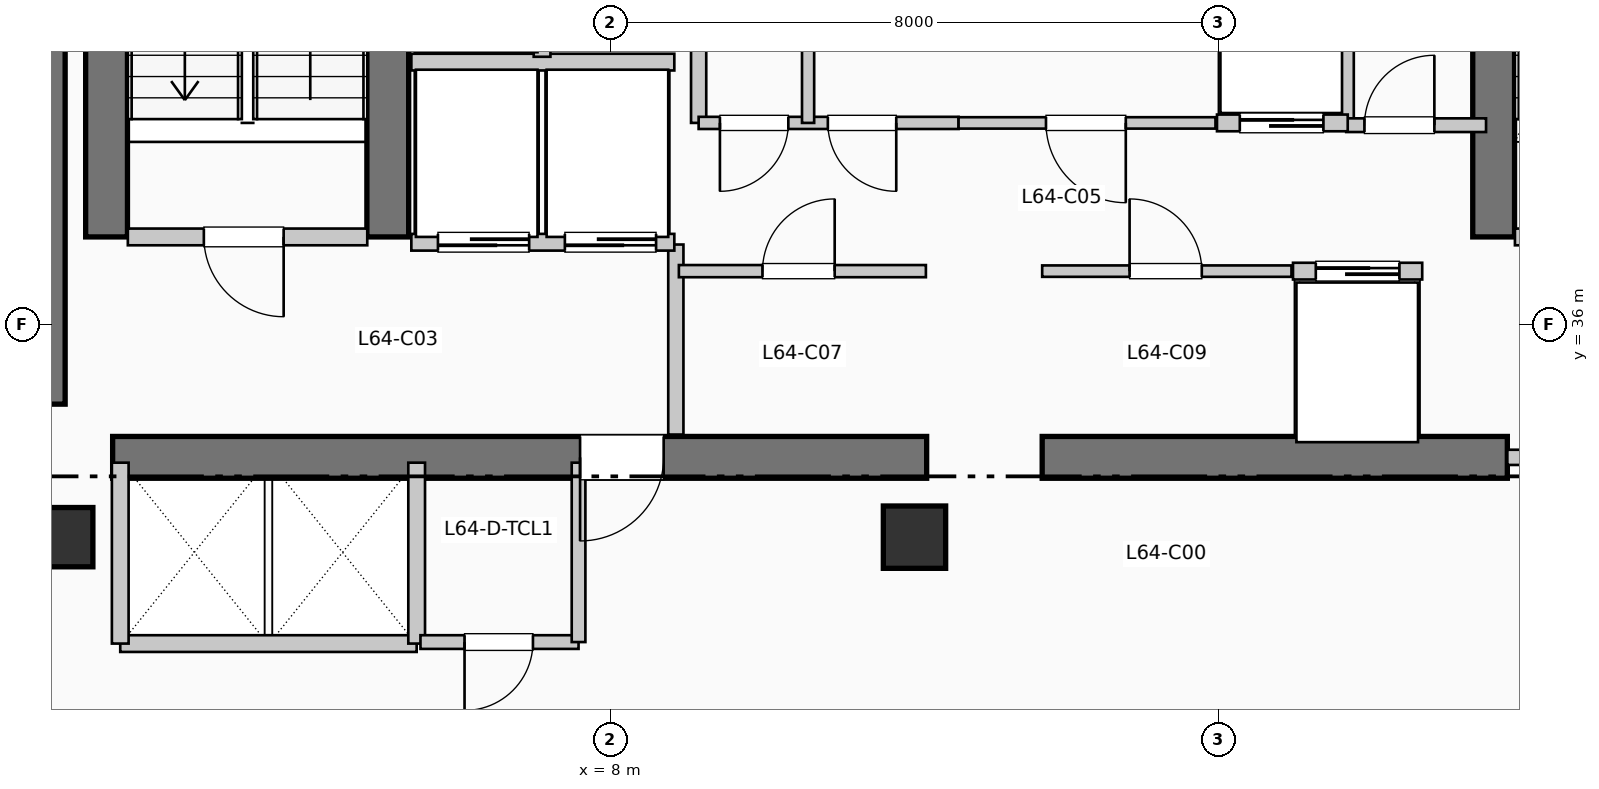
"""IFC4 building model, lengths in metres.
Left out: names, types, materials, properties, quantities, classifications, styles, units other than length and angle.
Written with IfcOpenShell. Run it as: python <this file> out.ifc"""

import sys

from ifc_helpers import new_model, si_unit, direction, frame, frame_2d, origin, origin_2d, place, context, subcontext, project, spatial, rectangle, extrude, element, fill, save


model = new_model("IFC4")
c1 = context("Model", 3, precision=1e-05, world=origin(), true_north=direction((0.0, 1.0)))
c2 = subcontext(c1, "Body", "Model", "MODEL_VIEW")
j1 = project(units=[si_unit("LENGTHUNIT", "METRE"), si_unit("PLANEANGLEUNIT", "RADIAN")], contexts=[c1])
p1 = place(None, origin())
s1 = spatial("IfcSite", under=j1, at=p1, CompositionType="ELEMENT")
p2 = place(p1, origin())
s2 = spatial("IfcBuilding", under=s1, at=p2, CompositionType="ELEMENT")
p3 = place(p2, frame((0.0, 0.0, 264.33)))
s3 = spatial("IfcBuildingStorey", under=s2, at=p3, CompositionType="ELEMENT", Elevation=264.33)
p4 = place(p3, frame((0.5, 34.95, 0.0), z_axis=(0.0, 0.0, 1.0), x_axis=(0.0, 1.0, 0.0)))
e1 = element("IfcWall", 1, at=p4, inside=s3, PredefinedType="SHEAR", context=c2, shape_type="SweptSolid", body=[
    extrude(rectangle(XDim=7.9, YDim=0.65, at=frame_2d((3.95, 0.0))), origin(), (0.0, 0.0, 1.0), 3.96),
])
p5 = place(p3, frame((1.45, 34.25, 0.0), z_axis=(0.0, 0.0, 1.0), x_axis=(1.0, 0.0, 0.0)))
e2 = element("IfcWall", 2, at=p5, inside=s3, PredefinedType="SHEAR", context=c2, shape_type="SweptSolid", body=[
    extrude(rectangle(XDim=10.71, YDim=0.55, at=frame_2d((5.355, 0.0))), origin(), (0.0, 0.0, 1.0), 3.96),
])
p6 = place(p5, frame((7.25, 0.0, 0.0), z_axis=(0.0, 0.0, 1.0), x_axis=(-1.0, 0.0, 0.0)))
e3 = element("IfcOpeningElement", 3, at=p6, cuts=e2, PredefinedType="OPENING", context=c2, shape_type="SweptSolid", body=[
    extrude(rectangle(XDim=1.1, YDim=2.15, at=frame_2d((0.55, 1.075))), frame((0.0, 0.285, 0.0), z_axis=(0.0, -1.0, 0.0), x_axis=(1.0, 0.0, 0.0)), (0.0, 0.0, 1.0), 0.57),
])
p7 = place(p3, frame((13.68, 34.25, 0.0), z_axis=(0.0, 0.0, 1.0), x_axis=(1.0, 0.0, 0.0)))
e4 = element("IfcWall", 4, at=p7, inside=s3, PredefinedType="SHEAR", context=c2, shape_type="SweptSolid", body=[
    extrude(rectangle(XDim=6.12, YDim=0.55, at=frame_2d((3.06, 0.0))), origin(), (0.0, 0.0, 1.0), 3.96),
])
for number, where, z_axis, x_axis in (
    (5, (1.37, 37.15, 0.0), (0.0, 0.0, 1.0), (0.0, 1.0, 0.0)),
    (6, (5.07, 37.15, 0.0), (0.0, 0.0, 1.0), (0.0, 1.0, 0.0)),
    (7, (19.62, 37.15, 0.0), (0.0, 0.0, 1.0), (0.0, 1.0, 0.0)),
):
    element("IfcWall", number, at=place(p3, frame(where, z_axis=z_axis, x_axis=x_axis)), inside=s3, PredefinedType="SHEAR", context=c2, shape_type="SweptSolid", body=[
        extrude(rectangle(XDim=7.89, YDim=0.55, at=frame_2d((3.945, 0.0))), origin(), (0.0, 0.0, 1.0), 3.96),
    ])
p8 = place(p3, frame((0.8, 33.2, 0.0), z_axis=(0.0, 0.0, 1.0), x_axis=(1.0, 0.0, 0.0)))
e8 = element("IfcColumn", 8, at=p8, inside=s3, PredefinedType="COLUMN", context=c2, shape_type="SweptSolid", body=[
    extrude(rectangle(XDim=0.78, YDim=0.78, at=origin_2d()), origin(), (0.0, 0.0, 1.0), 3.96),
])
p9 = place(p3, frame((12.0, 33.2, 0.0), z_axis=(0.0, 0.0, 1.0), x_axis=(1.0, 0.0, 0.0)))
e9 = element("IfcColumn", 9, at=p9, inside=s3, PredefinedType="COLUMN", context=c2, shape_type="SweptSolid", body=[
    extrude(rectangle(XDim=0.82, YDim=0.82, at=origin_2d()), origin(), (0.0, 0.0, 1.0), 3.96),
])
p10 = place(p3, frame((1.65, 37.15, 0.0), z_axis=(0.0, 0.0, 1.0), x_axis=(1.0, 0.0, 0.0)))
e10 = element("IfcWall", 10, at=p10, inside=s3, PredefinedType="PARTITIONING", context=c2, shape_type="SweptSolid", body=[
    extrude(rectangle(XDim=3.15, YDim=0.22, at=frame_2d((1.575, 0.0))), origin(), (0.0, 0.0, 1.0), 3.71),
])
p11 = place(p10, frame((2.05, 0.0, 0.0), z_axis=(0.0, 0.0, 1.0), x_axis=(-1.0, 0.0, 0.0)))
e11 = element("IfcOpeningElement", 11, at=p11, cuts=e10, PredefinedType="OPENING", context=c2, shape_type="SweptSolid", body=[
    extrude(rectangle(XDim=1.05, YDim=2.15, at=frame_2d((0.525, 1.075))), frame((0.0, 0.12, 0.0), z_axis=(0.0, -1.0, 0.0), x_axis=(1.0, 0.0, 0.0)), (0.0, 0.0, 1.0), 0.24),
])
p12 = place(p3, frame((8.86, 34.55, 0.0), z_axis=(0.0, 0.0, 1.0), x_axis=(0.0, 1.0, 0.0)))
e12 = element("IfcWall", 12, at=p12, inside=s3, PredefinedType="PARTITIONING", context=c2, shape_type="SweptSolid", body=[
    extrude(rectangle(XDim=2.5, YDim=0.2, at=frame_2d((1.25, 0.0))), origin(), (0.0, 0.0, 1.0), 3.71),
])
p13 = place(p3, frame((19.9, 37.15, 0.0), z_axis=(0.0, 0.0, 1.0), x_axis=(1.0, 0.0, 0.0)))
e13 = element("IfcWall", 13, at=p13, inside=s3, PredefinedType="PARTITIONING", context=c2, shape_type="SweptSolid", body=[
    extrude(rectangle(XDim=3.15, YDim=0.22, at=frame_2d((1.575, 0.0))), origin(), (0.0, 0.0, 1.0), 3.71),
])
p14 = place(p13, frame((2.05, 0.0, 0.0), z_axis=(0.0, 0.0, 1.0), x_axis=(-1.0, 0.0, 0.0)))
e14 = element("IfcOpeningElement", 14, at=p14, cuts=e13, PredefinedType="OPENING", context=c2, shape_type="SweptSolid", body=[
    extrude(rectangle(XDim=1.05, YDim=2.15, at=frame_2d((0.525, 1.075))), frame((0.0, 0.12, 0.0), z_axis=(0.0, -1.0, 0.0), x_axis=(1.0, 0.0, 0.0)), (0.0, 0.0, 1.0), 0.24),
])
p15 = place(p3, frame((19.8, 34.25, 0.0), z_axis=(0.0, 0.0, 1.0), x_axis=(1.0, 0.0, 0.0)))
e15 = element("IfcWall", 15, at=p15, inside=s3, PredefinedType="PARTITIONING", context=c2, shape_type="SweptSolid", body=[
    extrude(rectangle(XDim=3.25, YDim=0.2, at=frame_2d((1.625, 0.0))), origin(), (0.0, 0.0, 1.0), 3.71),
])
p16 = place(p15, frame((2.15, 0.0, 0.0), z_axis=(0.0, 0.0, 1.0), x_axis=(-1.0, 0.0, 0.0)))
e16 = element("IfcOpeningElement", 16, at=p16, cuts=e15, PredefinedType="OPENING", context=c2, shape_type="SweptSolid", body=[
    extrude(rectangle(XDim=1.1, YDim=2.15, at=frame_2d((0.55, 1.075))), frame((0.0, 0.11, 0.0), z_axis=(0.0, -1.0, 0.0), x_axis=(1.0, 0.0, 0.0)), (0.0, 0.0, 1.0), 0.22),
])
p17 = place(p3, frame((5.38, 37.08, 0.0), z_axis=(0.0, 0.0, 1.0), x_axis=(1.0, 0.0, 0.0)))
e17 = element("IfcWall", 17, at=p17, inside=s3, PredefinedType="PARTITIONING", context=c2, shape_type="SweptSolid", body=[
    extrude(rectangle(XDim=3.46, YDim=0.22, at=frame_2d((1.73, 0.0))), origin(), (0.0, 0.0, 1.0), 3.71),
])
p18 = place(p17, frame((1.55, 0.0, 0.0), z_axis=(0.0, 0.0, 1.0), x_axis=(-1.0, 0.0, 0.0)))
e18 = element("IfcOpeningElement", 18, at=p18, cuts=e17, PredefinedType="OPENING", context=c2, shape_type="SweptSolid", body=[
    extrude(rectangle(XDim=1.2, YDim=2.2, at=frame_2d((0.6, 1.1))), frame((0.0, 0.12, 0.0), z_axis=(0.0, -1.0, 0.0), x_axis=(1.0, 0.0, 0.0)), (0.0, 0.0, 1.0), 0.24),
])
p19 = place(p17, frame((3.22, 0.0, 0.0), z_axis=(0.0, 0.0, 1.0), x_axis=(-1.0, 0.0, 0.0)))
e19 = element("IfcOpeningElement", 19, at=p19, cuts=e17, PredefinedType="OPENING", context=c2, shape_type="SweptSolid", body=[
    extrude(rectangle(XDim=1.2, YDim=2.2, at=frame_2d((0.6, 1.1))), frame((0.0, 0.12, 0.0), z_axis=(0.0, -1.0, 0.0), x_axis=(1.0, 0.0, 0.0)), (0.0, 0.0, 1.0), 0.24),
])
p20 = place(p3, frame((5.38, 39.45, 0.0), z_axis=(0.0, 0.0, 1.0), x_axis=(1.0, 0.0, 0.0)))
e20 = element("IfcWall", 20, at=p20, inside=s3, PredefinedType="PARTITIONING", context=c2, shape_type="SweptSolid", body=[
    extrude(rectangle(XDim=3.46, YDim=0.22, at=frame_2d((1.73, 0.0))), origin(), (0.0, 0.0, 1.0), 3.71),
])
p21 = place(p3, frame((7.1, 39.52, 0.0), z_axis=(0.0, 0.0, 1.0), x_axis=(0.0, 1.0, 0.0)))
e21 = element("IfcWall", 21, at=p21, inside=s3, PredefinedType="PARTITIONING", context=c2, shape_type="SweptSolid", body=[
    extrude(rectangle(XDim=2.93, YDim=0.22, at=frame_2d((1.465, 0.0))), origin(), (0.0, 0.0, 1.0), 3.71),
])
p22 = place(p21, frame((0.85, 0.0, 0.0)))
e22 = element("IfcOpeningElement", 22, at=p22, cuts=e21, PredefinedType="OPENING", context=c2, shape_type="SweptSolid", body=[
    extrude(rectangle(XDim=1.1, YDim=2.2, at=frame_2d((0.55, 1.1))), frame((0.0, 0.12, 0.0), z_axis=(0.0, -1.0, 0.0), x_axis=(1.0, 0.0, 0.0)), (0.0, 0.0, 1.0), 0.24),
])
p23 = place(p3, frame((1.55, 31.8, 0.0), z_axis=(0.0, 0.0, 1.0), x_axis=(1.0, 0.0, 0.0)))
e23 = element("IfcWall", 23, at=p23, inside=s3, PredefinedType="PARTITIONING", context=c2, shape_type="SweptSolid", body=[
    extrude(rectangle(XDim=3.9, YDim=0.22, at=frame_2d((1.95, 0.0))), origin(), (0.0, 0.0, 1.0), 3.71),
])
for number, where, z_axis, x_axis in (
    (24, (1.55, 31.8, 0.0), (0.0, 0.0, 1.0), (0.0, 1.0, 0.0)),
    (25, (5.45, 31.8, 0.0), (0.0, 0.0, 1.0), (0.0, 1.0, 0.0)),
):
    element("IfcWall", number, at=place(p3, frame(where, z_axis=z_axis, x_axis=x_axis)), inside=s3, PredefinedType="PARTITIONING", context=c2, shape_type="SweptSolid", body=[
        extrude(rectangle(XDim=2.38, YDim=0.22, at=frame_2d((1.19, 0.0))), origin(), (0.0, 0.0, 1.0), 3.71),
    ])
for number, where, z_axis, x_axis in (
    (26, (9.16, 38.65, 0.0), (0.0, 0.0, 1.0), (0.0, 1.0, 0.0)),
    (27, (17.68, 38.65, 0.0), (0.0, 0.0, 1.0), (0.0, 1.0, 0.0)),
):
    element("IfcWall", number, at=place(p3, frame(where, z_axis=z_axis, x_axis=x_axis)), inside=s3, PredefinedType="PARTITIONING", context=c2, shape_type="SweptSolid", body=[
        extrude(rectangle(XDim=2.35, YDim=0.2, at=frame_2d((1.175, 0.0))), origin(), (0.0, 0.0, 1.0), 3.71),
    ])
p24 = place(p3, frame((17.68, 38.62, 0.0), z_axis=(0.0, 0.0, 1.0), x_axis=(1.0, 0.0, 0.0)))
e28 = element("IfcWall", 28, at=p24, inside=s3, PredefinedType="PARTITIONING", context=c2, shape_type="SweptSolid", body=[
    extrude(rectangle(XDim=1.84, YDim=0.18, at=frame_2d((0.92, 0.0))), origin(), (0.0, 0.0, 1.0), 3.71),
])
p25 = place(p24, frame((0.24, 0.0, 0.0)))
e29 = element("IfcOpeningElement", 29, at=p25, cuts=e28, PredefinedType="OPENING", context=c2, shape_type="SweptSolid", body=[
    extrude(rectangle(XDim=0.92, YDim=2.1, at=frame_2d((0.46, 1.05))), frame((0.0, 0.1, 0.0), z_axis=(0.0, -1.0, 0.0), x_axis=(1.0, 0.0, 0.0)), (0.0, 0.0, 1.0), 0.2),
])
p26 = place(p3, frame((5.5, 31.82, 0.0), z_axis=(0.0, 0.0, 1.0), x_axis=(1.0, 0.0, 0.0)))
e30 = element("IfcWall", 30, at=p26, inside=s3, PredefinedType="PLUMBINGWALL", context=c2, shape_type="SweptSolid", body=[
    extrude(rectangle(XDim=2.08, YDim=0.18, at=frame_2d((1.04, 0.0))), origin(), (0.0, 0.0, 1.0), 3.71),
])
p27 = place(p26, frame((1.48, 0.0, 0.0), z_axis=(0.0, 0.0, 1.0), x_axis=(-1.0, 0.0, 0.0)))
e31 = element("IfcOpeningElement", 31, at=p27, cuts=e30, PredefinedType="OPENING", context=c2, shape_type="SweptSolid", body=[
    extrude(rectangle(XDim=0.9, YDim=2.1, at=frame_2d((0.45, 1.05))), frame((0.0, 0.1, 0.0), z_axis=(0.0, -1.0, 0.0), x_axis=(1.0, 0.0, 0.0)), (0.0, 0.0, 1.0), 0.2),
])
p28 = place(p3, frame((7.58, 31.82, 0.0), z_axis=(0.0, 0.0, 1.0), x_axis=(0.0, 1.0, 0.0)))
e32 = element("IfcWall", 32, at=p28, inside=s3, PredefinedType="PLUMBINGWALL", context=c2, shape_type="SweptSolid", body=[
    extrude(rectangle(XDim=2.36, YDim=0.18, at=frame_2d((1.18, 0.0))), origin(), (0.0, 0.0, 1.0), 3.71),
])
p29 = place(p3, frame((8.9, 36.7, 0.0), z_axis=(0.0, 0.0, 1.0), x_axis=(1.0, 0.0, 0.0)))
e33 = element("IfcWall", 33, at=p29, inside=s3, PredefinedType="PARTITIONING", context=c2, shape_type="SweptSolid", body=[
    extrude(rectangle(XDim=3.25, YDim=0.16, at=frame_2d((1.625, 0.0))), origin(), (0.0, 0.0, 1.0), 3.71),
])
p30 = place(p29, frame((1.1, 0.0, 0.0)))
e34 = element("IfcOpeningElement", 34, at=p30, cuts=e33, PredefinedType="OPENING", context=c2, shape_type="SweptSolid", body=[
    extrude(rectangle(XDim=0.95, YDim=2.15, at=frame_2d((0.475, 1.075))), frame((0.0, 0.09, 0.0), z_axis=(0.0, -1.0, 0.0), x_axis=(1.0, 0.0, 0.0)), (0.0, 0.0, 1.0), 0.18),
])
p31 = place(p3, frame((9.16, 38.65, 0.0), z_axis=(0.0, 0.0, 1.0), x_axis=(1.0, 0.0, 0.0)))
e35 = element("IfcWall", 35, at=p31, inside=s3, PredefinedType="PARTITIONING", context=c2, shape_type="SweptSolid", body=[
    extrude(rectangle(XDim=3.42, YDim=0.16, at=frame_2d((1.71, 0.0))), origin(), (0.0, 0.0, 1.0), 3.71),
])
p32 = place(p31, frame((1.18, 0.0, 0.0), z_axis=(0.0, 0.0, 1.0), x_axis=(-1.0, 0.0, 0.0)))
e36 = element("IfcOpeningElement", 36, at=p32, cuts=e35, PredefinedType="OPENING", context=c2, shape_type="SweptSolid", body=[
    extrude(rectangle(XDim=0.9, YDim=2.15, at=frame_2d((0.45, 1.075))), frame((0.0, 0.09, 0.0), z_axis=(0.0, -1.0, 0.0), x_axis=(1.0, 0.0, 0.0)), (0.0, 0.0, 1.0), 0.18),
])
p33 = place(p31, frame((2.6, 0.0, 0.0), z_axis=(0.0, 0.0, 1.0), x_axis=(-1.0, 0.0, 0.0)))
e37 = element("IfcOpeningElement", 37, at=p33, cuts=e35, PredefinedType="OPENING", context=c2, shape_type="SweptSolid", body=[
    extrude(rectangle(XDim=0.9, YDim=2.15, at=frame_2d((0.45, 1.075))), frame((0.0, 0.09, 0.0), z_axis=(0.0, -1.0, 0.0), x_axis=(1.0, 0.0, 0.0)), (0.0, 0.0, 1.0), 0.18),
])
p34 = place(p3, frame((10.6, 38.65, 0.0), z_axis=(0.0, 0.0, 1.0), x_axis=(0.0, 1.0, 0.0)))
e38 = element("IfcWall", 38, at=p34, inside=s3, PredefinedType="PARTITIONING", context=c2, shape_type="SweptSolid", body=[
    extrude(rectangle(XDim=2.35, YDim=0.16, at=frame_2d((1.175, 0.0))), origin(), (0.0, 0.0, 1.0), 3.71),
])
p35 = place(p3, frame((13.68, 36.7, 0.0), z_axis=(0.0, 0.0, 1.0), x_axis=(1.0, 0.0, 0.0)))
e39 = element("IfcWall", 39, at=p35, inside=s3, PredefinedType="PARTITIONING", context=c2, shape_type="SweptSolid", body=[
    extrude(rectangle(XDim=3.28, YDim=0.15, at=frame_2d((1.64, 0.0))), origin(), (0.0, 0.0, 1.0), 3.71),
])
p36 = place(p35, frame((1.15, 0.0, 0.0)))
e40 = element("IfcOpeningElement", 40, at=p36, cuts=e39, PredefinedType="OPENING", context=c2, shape_type="SweptSolid", body=[
    extrude(rectangle(XDim=0.95, YDim=2.15, at=frame_2d((0.475, 1.075))), frame((0.0, 0.085, 0.0), z_axis=(0.0, -1.0, 0.0), x_axis=(1.0, 0.0, 0.0)), (0.0, 0.0, 1.0), 0.17),
])
p37 = place(p3, frame((12.58, 38.65, 0.0), z_axis=(0.0, 0.0, 1.0), x_axis=(1.0, 0.0, 0.0)))
e41 = element("IfcWall", 41, at=p37, inside=s3, PredefinedType="PARTITIONING", context=c2, shape_type="SweptSolid", body=[
    extrude(rectangle(XDim=3.38, YDim=0.15, at=frame_2d((1.69, 0.0))), origin(), (0.0, 0.0, 1.0), 3.71),
])
p38 = place(p37, frame((2.2, 0.0, 0.0), z_axis=(0.0, 0.0, 1.0), x_axis=(-1.0, 0.0, 0.0)))
e42 = element("IfcOpeningElement", 42, at=p38, cuts=e41, PredefinedType="OPENING", context=c2, shape_type="SweptSolid", body=[
    extrude(rectangle(XDim=1.05, YDim=2.15, at=frame_2d((0.525, 1.075))), frame((0.0, 0.085, 0.0), z_axis=(0.0, -1.0, 0.0), x_axis=(1.0, 0.0, 0.0)), (0.0, 0.0, 1.0), 0.17),
])
p39 = place(p3, frame((16.98, 36.7, 0.0), z_axis=(0.0, 0.0, 1.0), x_axis=(1.0, 0.0, 0.0)))
e43 = element("IfcWall", 43, at=p39, inside=s3, PredefinedType="PARTITIONING", context=c2, shape_type="SweptSolid", body=[
    extrude(rectangle(XDim=1.7, YDim=0.22, at=frame_2d((0.85, 0.0))), origin(), (0.0, 0.0, 1.0), 3.71),
])
p40 = place(p39, frame((0.3, 0.0, 0.0)))
e44 = element("IfcOpeningElement", 44, at=p40, cuts=e43, PredefinedType="OPENING", context=c2, shape_type="SweptSolid", body=[
    extrude(rectangle(XDim=1.1, YDim=2.2, at=frame_2d((0.55, 1.1))), frame((0.0, 0.12, 0.0), z_axis=(0.0, -1.0, 0.0), x_axis=(1.0, 0.0, 0.0)), (0.0, 0.0, 1.0), 0.24),
])
p41 = place(p3, frame((15.98, 38.65, 0.0), z_axis=(0.0, 0.0, 1.0), x_axis=(1.0, 0.0, 0.0)))
e45 = element("IfcWall", 45, at=p41, inside=s3, PredefinedType="PARTITIONING", context=c2, shape_type="SweptSolid", body=[
    extrude(rectangle(XDim=1.72, YDim=0.22, at=frame_2d((0.86, 0.0))), origin(), (0.0, 0.0, 1.0), 3.71),
])
p42 = place(p41, frame((0.3, 0.0, 0.0)))
e46 = element("IfcOpeningElement", 46, at=p42, cuts=e45, PredefinedType="OPENING", context=c2, shape_type="SweptSolid", body=[
    extrude(rectangle(XDim=1.1, YDim=2.2, at=frame_2d((0.55, 1.1))), frame((0.0, 0.12, 0.0), z_axis=(0.0, -1.0, 0.0), x_axis=(1.0, 0.0, 0.0)), (0.0, 0.0, 1.0), 0.24),
])
p43 = place(p11, origin())
e47 = element("IfcDoor", 47, at=p43, inside=s3, OperationType="SINGLE_SWING_RIGHT", PredefinedType="DOOR", context=c2, shape_type="SweptSolid", body=[
    extrude(rectangle(XDim=1.05, YDim=2.15, at=frame_2d((0.525, 1.075))), frame((0.0, 0.025, 0.0), z_axis=(0.0, -1.0, 0.0), x_axis=(1.0, 0.0, 0.0)), (0.0, 0.0, 1.0), 0.05),
])
fill(e11, e47)
p44 = place(p6, origin())
e48 = element("IfcDoor", 48, at=p44, inside=s3, OperationType="SINGLE_SWING_LEFT", PredefinedType="DOOR", context=c2, shape_type="SweptSolid", body=[
    extrude(rectangle(XDim=1.1, YDim=2.15, at=frame_2d((0.55, 1.075))), frame((0.0, 0.025, 0.0), z_axis=(0.0, -1.0, 0.0), x_axis=(1.0, 0.0, 0.0)), (0.0, 0.0, 1.0), 0.05),
])
fill(e3, e48)
p45 = place(p18, origin())
e49 = element("IfcDoor", 49, at=p45, inside=s3, OperationType="SLIDING_TO_RIGHT", PredefinedType="DOOR", context=c2, shape_type="SweptSolid", body=[
    extrude(rectangle(XDim=1.2, YDim=2.2, at=frame_2d((0.6, 1.1))), frame((0.0, 0.025, 0.0), z_axis=(0.0, -1.0, 0.0), x_axis=(1.0, 0.0, 0.0)), (0.0, 0.0, 1.0), 0.05),
])
fill(e18, e49)
p46 = place(p19, origin())
e50 = element("IfcDoor", 50, at=p46, inside=s3, OperationType="SLIDING_TO_RIGHT", PredefinedType="DOOR", context=c2, shape_type="SweptSolid", body=[
    extrude(rectangle(XDim=1.2, YDim=2.2, at=frame_2d((0.6, 1.1))), frame((0.0, 0.025, 0.0), z_axis=(0.0, -1.0, 0.0), x_axis=(1.0, 0.0, 0.0)), (0.0, 0.0, 1.0), 0.05),
])
fill(e19, e50)
p47 = place(p25, origin())
e51 = element("IfcDoor", 51, at=p47, inside=s3, OperationType="SINGLE_SWING_RIGHT", PredefinedType="DOOR", context=c2, shape_type="SweptSolid", body=[
    extrude(rectangle(XDim=0.92, YDim=2.1, at=frame_2d((0.46, 1.05))), frame((0.0, 0.025, 0.0), z_axis=(0.0, -1.0, 0.0), x_axis=(1.0, 0.0, 0.0)), (0.0, 0.0, 1.0), 0.05),
])
fill(e29, e51)
p48 = place(p27, origin())
e52 = element("IfcDoor", 52, at=p48, inside=s3, OperationType="SINGLE_SWING_LEFT", PredefinedType="DOOR", context=c2, shape_type="SweptSolid", body=[
    extrude(rectangle(XDim=0.9, YDim=2.1, at=frame_2d((0.45, 1.05))), frame((0.0, 0.025, 0.0), z_axis=(0.0, -1.0, 0.0), x_axis=(1.0, 0.0, 0.0)), (0.0, 0.0, 1.0), 0.05),
])
fill(e31, e52)
p49 = place(p30, origin())
e53 = element("IfcDoor", 53, at=p49, inside=s3, OperationType="SINGLE_SWING_RIGHT", PredefinedType="DOOR", context=c2, shape_type="SweptSolid", body=[
    extrude(rectangle(XDim=0.95, YDim=2.15, at=frame_2d((0.475, 1.075))), frame((0.0, 0.025, 0.0), z_axis=(0.0, -1.0, 0.0), x_axis=(1.0, 0.0, 0.0)), (0.0, 0.0, 1.0), 0.05),
])
fill(e34, e53)
p50 = place(p32, origin())
e54 = element("IfcDoor", 54, at=p50, inside=s3, OperationType="SINGLE_SWING_LEFT", PredefinedType="DOOR", context=c2, shape_type="SweptSolid", body=[
    extrude(rectangle(XDim=0.9, YDim=2.15, at=frame_2d((0.45, 1.075))), frame((0.0, 0.025, 0.0), z_axis=(0.0, -1.0, 0.0), x_axis=(1.0, 0.0, 0.0)), (0.0, 0.0, 1.0), 0.05),
])
fill(e36, e54)
p51 = place(p33, origin())
e55 = element("IfcDoor", 55, at=p51, inside=s3, OperationType="SINGLE_SWING_RIGHT", PredefinedType="DOOR", context=c2, shape_type="SweptSolid", body=[
    extrude(rectangle(XDim=0.9, YDim=2.15, at=frame_2d((0.45, 1.075))), frame((0.0, 0.025, 0.0), z_axis=(0.0, -1.0, 0.0), x_axis=(1.0, 0.0, 0.0)), (0.0, 0.0, 1.0), 0.05),
])
fill(e37, e55)
p52 = place(p36, origin())
e56 = element("IfcDoor", 56, at=p52, inside=s3, OperationType="SINGLE_SWING_LEFT", PredefinedType="DOOR", context=c2, shape_type="SweptSolid", body=[
    extrude(rectangle(XDim=0.95, YDim=2.15, at=frame_2d((0.475, 1.075))), frame((0.0, 0.025, 0.0), z_axis=(0.0, -1.0, 0.0), x_axis=(1.0, 0.0, 0.0)), (0.0, 0.0, 1.0), 0.05),
])
fill(e40, e56)
p53 = place(p38, origin())
e57 = element("IfcDoor", 57, at=p53, inside=s3, OperationType="SINGLE_SWING_RIGHT", PredefinedType="DOOR", context=c2, shape_type="SweptSolid", body=[
    extrude(rectangle(XDim=1.05, YDim=2.15, at=frame_2d((0.525, 1.075))), frame((0.0, 0.025, 0.0), z_axis=(0.0, -1.0, 0.0), x_axis=(1.0, 0.0, 0.0)), (0.0, 0.0, 1.0), 0.05),
])
fill(e42, e57)
p54 = place(p40, origin())
e58 = element("IfcDoor", 58, at=p54, inside=s3, OperationType="SLIDING_TO_LEFT", PredefinedType="DOOR", context=c2, shape_type="SweptSolid", body=[
    extrude(rectangle(XDim=1.1, YDim=2.2, at=frame_2d((0.55, 1.1))), frame((0.0, 0.025, 0.0), z_axis=(0.0, -1.0, 0.0), x_axis=(1.0, 0.0, 0.0)), (0.0, 0.0, 1.0), 0.05),
])
fill(e44, e58)
p55 = place(p42, origin())
e59 = element("IfcDoor", 59, at=p55, inside=s3, OperationType="SLIDING_TO_LEFT", PredefinedType="DOOR", context=c2, shape_type="SweptSolid", body=[
    extrude(rectangle(XDim=1.1, YDim=2.2, at=frame_2d((0.55, 1.1))), frame((0.0, 0.025, 0.0), z_axis=(0.0, -1.0, 0.0), x_axis=(1.0, 0.0, 0.0)), (0.0, 0.0, 1.0), 0.05),
])
fill(e46, e59)
save(model, sys.argv[1])
